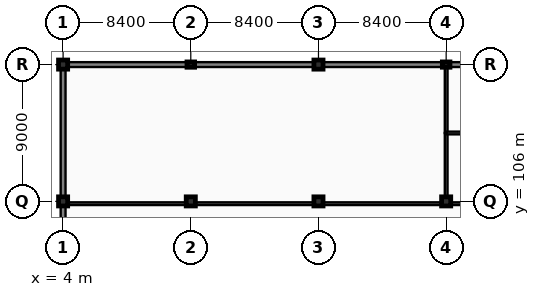
"""IFC4 building model, lengths in metres.
Left out: names, types, materials, properties, quantities, classifications, styles, units other than length and angle.
Written with IfcOpenShell. Run it as: python <this file> out.ifc"""

import sys

from ifc_helpers import new_model, si_unit, direction, frame, frame_2d, origin, origin_2d, place, context, subcontext, project, spatial, rectangle, extrude, element, fill, save


model = new_model("IFC4")
c1 = context("Model", 3, precision=1e-05, world=origin(), true_north=direction((0.0, 1.0)))
c2 = subcontext(c1, "Body", "Model", "MODEL_VIEW")
j1 = project(units=[si_unit("LENGTHUNIT", "METRE"), si_unit("PLANEANGLEUNIT", "RADIAN")], contexts=[c1])
p1 = place(None, origin())
s1 = spatial("IfcSite", under=j1, at=p1, CompositionType="ELEMENT")
p2 = place(p1, origin())
s2 = spatial("IfcBuilding", under=s1, at=p2, CompositionType="ELEMENT")
p3 = place(p2, origin())
s3 = spatial("IfcBuildingStorey", under=s2, at=p3, CompositionType="ELEMENT", Elevation=0.0)
for number, where, z_axis, x_axis in (
    (1, (4.0, 106.0, 0.0), (0.0, 0.0, 1.0), (1.0, 0.0, 0.0)),
    (2, (4.0, 115.0, 0.0), (0.0, 0.0, 1.0), (1.0, 0.0, 0.0)),
    (3, (12.4, 106.0, 0.0), (0.0, 0.0, 1.0), (1.0, 0.0, 0.0)),
):
    element("IfcColumn", number, at=place(p3, frame(where, z_axis=z_axis, x_axis=x_axis)), inside=s3, PredefinedType="COLUMN", context=c2, shape_type="SweptSolid", body=[
        extrude(rectangle(XDim=0.6, YDim=0.6, at=origin_2d()), origin(), (0.0, 0.0, 1.0), 5.4),
    ])
p4 = place(p3, frame((12.4, 115.0, 0.0), z_axis=(0.0, 0.0, 1.0), x_axis=(1.0, 0.0, 0.0)))
e4 = element("IfcColumn", 4, at=p4, inside=s3, PredefinedType="PILASTER", context=c2, shape_type="SweptSolid", body=[
    extrude(rectangle(XDim=0.5, YDim=0.35, at=origin_2d()), origin(), (0.0, 0.0, 1.0), 5.4),
])
for number, where, z_axis, x_axis in (
    (5, (20.8, 106.0, 0.0), (0.0, 0.0, 1.0), (1.0, 0.0, 0.0)),
    (6, (20.8, 115.0, 0.0), (0.0, 0.0, 1.0), (1.0, 0.0, 0.0)),
    (7, (29.2, 106.0, 0.0), (0.0, 0.0, 1.0), (1.0, 0.0, 0.0)),
):
    element("IfcColumn", number, at=place(p3, frame(where, z_axis=z_axis, x_axis=x_axis)), inside=s3, PredefinedType="COLUMN", context=c2, shape_type="SweptSolid", body=[
        extrude(rectangle(XDim=0.6, YDim=0.6, at=origin_2d()), origin(), (0.0, 0.0, 1.0), 5.4),
    ])
p5 = place(p3, frame((29.2, 115.0, 0.0), z_axis=(0.0, 0.0, 1.0), x_axis=(1.0, 0.0, 0.0)))
e8 = element("IfcColumn", 8, at=p5, inside=s3, PredefinedType="PILASTER", context=c2, shape_type="SweptSolid", body=[
    extrude(rectangle(XDim=0.5, YDim=0.35, at=origin_2d()), origin(), (0.0, 0.0, 1.0), 5.4),
])
p6 = place(p3, frame((4.15, 105.85, 0.0), z_axis=(0.0, 0.0, 1.0), x_axis=(1.0, 0.0, 0.0)))
e9 = element("IfcWall", 9, at=p6, inside=s3, PredefinedType="PARTITIONING", context=c2, shape_type="SweptSolid", body=[
    extrude(rectangle(XDim=25.05, YDim=0.18, at=frame_2d((12.525, 0.0))), origin(), (0.0, 0.0, 1.0), 4.54),
])
p7 = place(p6, frame((10.822, 0.0, -0.01)))
e10 = element("IfcOpeningElement", 10, at=p7, cuts=e9, PredefinedType="OPENING", context=c2, shape_type="SweptSolid", body=[
    extrude(rectangle(XDim=1.0, YDim=2.16, at=frame_2d((0.5, 1.08))), frame((0.0, 0.1, 0.0), z_axis=(0.0, -1.0, 0.0), x_axis=(1.0, 0.0, 0.0)), (0.0, 0.0, 1.0), 0.2),
])
p8 = place(p3, frame((29.2, 105.85, 0.0), z_axis=(0.0, 0.0, 1.0), x_axis=(1.0, 0.0, 0.0)))
e11 = element("IfcWall", 11, at=p8, inside=s3, PredefinedType="PARTITIONING", context=c2, shape_type="SweptSolid", body=[
    extrude(rectangle(XDim=4.65, YDim=0.18, at=frame_2d((2.325, 0.0))), origin(), (0.0, 0.0, 1.0), 4.54),
])
p9 = place(p8, frame((1.643, 0.0, -0.01)))
e12 = element("IfcOpeningElement", 12, at=p9, cuts=e11, PredefinedType="OPENING", context=c2, shape_type="SweptSolid", body=[
    extrude(rectangle(XDim=1.0, YDim=2.16, at=frame_2d((0.5, 1.08))), frame((0.0, 0.1, 0.0), z_axis=(0.0, -1.0, 0.0), x_axis=(1.0, 0.0, 0.0)), (0.0, 0.0, 1.0), 0.2),
])
p10 = place(p3, frame((29.2, 105.85, 0.0), z_axis=(0.0, 0.0, 1.0), x_axis=(0.0, 1.0, 0.0)))
e13 = element("IfcWall", 13, at=p10, inside=s3, PredefinedType="PARTITIONING", context=c2, shape_type="SweptSolid", body=[
    extrude(rectangle(XDim=4.65, YDim=0.18, at=frame_2d((2.325, 0.0))), origin(), (0.0, 0.0, 1.0), 4.54),
])
p11 = place(p3, frame((29.2, 110.5, 0.0), z_axis=(0.0, 0.0, 1.0), x_axis=(0.0, 1.0, 0.0)))
e14 = element("IfcWall", 14, at=p11, inside=s3, PredefinedType="PARTITIONING", context=c2, shape_type="SweptSolid", body=[
    extrude(rectangle(XDim=4.35, YDim=0.18, at=frame_2d((2.175, 0.0))), origin(), (0.0, 0.0, 1.0), 4.64),
])
p12 = place(p11, frame((1.675, 0.0, -0.01)))
e15 = element("IfcOpeningElement", 15, at=p12, cuts=e14, PredefinedType="OPENING", context=c2, shape_type="SweptSolid", body=[
    extrude(rectangle(XDim=1.0, YDim=2.16, at=frame_2d((0.5, 1.08))), frame((0.0, 0.1, 0.0), z_axis=(0.0, -1.0, 0.0), x_axis=(1.0, 0.0, 0.0)), (0.0, 0.0, 1.0), 0.2),
])
p13 = place(p3, frame((29.2, 110.5, 0.0), z_axis=(0.0, 0.0, 1.0), x_axis=(1.0, 0.0, 0.0)))
e16 = element("IfcWall", 16, at=p13, inside=s3, PredefinedType="PARTITIONING", context=c2, shape_type="SweptSolid", body=[
    extrude(rectangle(XDim=8.9, YDim=0.18, at=frame_2d((4.45, 0.0))), origin(), (0.0, 0.0, 1.0), 4.64),
])
p14 = place(p13, frame((1.975, 0.0, -0.01)))
e17 = element("IfcOpeningElement", 17, at=p14, cuts=e16, PredefinedType="OPENING", context=c2, shape_type="SweptSolid", body=[
    extrude(rectangle(XDim=1.0, YDim=2.16, at=frame_2d((0.5, 1.08))), frame((0.0, 0.1, 0.0), z_axis=(0.0, -1.0, 0.0), x_axis=(1.0, 0.0, 0.0)), (0.0, 0.0, 1.0), 0.2),
])
p15 = place(p3, frame((12.4, 115.0, 0.0), z_axis=(0.0, 0.0, 1.0), x_axis=(-1.0, 0.0, 0.0)))
e18 = element("IfcWall", 18, at=p15, inside=s3, PredefinedType="SOLIDWALL", context=c2, shape_type="SweptSolid", body=[
    extrude(rectangle(XDim=8.4, YDim=0.32, at=frame_2d((4.2, 0.0))), origin(), (0.0, 0.0, 1.0), 4.64),
])
p16 = place(p15, frame((0.46, 0.0, 0.9)))
e19 = element("IfcOpeningElement", 19, at=p16, cuts=e18, PredefinedType="OPENING", context=c2, shape_type="SweptSolid", body=[
    extrude(rectangle(XDim=2.4, YDim=2.35, at=frame_2d((1.2, 1.175))), frame((0.0, 0.17, 0.0), z_axis=(0.0, -1.0, 0.0), x_axis=(1.0, 0.0, 0.0)), (0.0, 0.0, 1.0), 0.34),
])
p17 = place(p15, frame((5.46, 0.0, 0.9)))
e20 = element("IfcOpeningElement", 20, at=p17, cuts=e18, PredefinedType="OPENING", context=c2, shape_type="SweptSolid", body=[
    extrude(rectangle(XDim=2.4, YDim=2.35, at=frame_2d((1.2, 1.175))), frame((0.0, 0.17, 0.0), z_axis=(0.0, -1.0, 0.0), x_axis=(1.0, 0.0, 0.0)), (0.0, 0.0, 1.0), 0.34),
])
p18 = place(p3, frame((20.8, 115.0, 0.0), z_axis=(0.0, 0.0, 1.0), x_axis=(-1.0, 0.0, 0.0)))
e21 = element("IfcWall", 21, at=p18, inside=s3, PredefinedType="SOLIDWALL", context=c2, shape_type="SweptSolid", body=[
    extrude(rectangle(XDim=8.4, YDim=0.32, at=frame_2d((4.2, 0.0))), origin(), (0.0, 0.0, 1.0), 4.64),
])
p19 = place(p18, frame((3.2, 0.0, -0.01)))
e22 = element("IfcOpeningElement", 22, at=p19, cuts=e21, PredefinedType="OPENING", context=c2, shape_type="SweptSolid", body=[
    extrude(rectangle(XDim=2.0, YDim=2.41, at=frame_2d((1.0, 1.205))), frame((0.0, 0.17, 0.0), z_axis=(0.0, -1.0, 0.0), x_axis=(1.0, 0.0, 0.0)), (0.0, 0.0, 1.0), 0.34),
])
p20 = place(p3, frame((29.2, 115.0, 0.0), z_axis=(0.0, 0.0, 1.0), x_axis=(-1.0, 0.0, 0.0)))
e23 = element("IfcWall", 23, at=p20, inside=s3, PredefinedType="SOLIDWALL", context=c2, shape_type="SweptSolid", body=[
    extrude(rectangle(XDim=8.4, YDim=0.32, at=frame_2d((4.2, 0.0))), origin(), (0.0, 0.0, 1.0), 4.64),
])
p21 = place(p20, frame((0.46, 0.0, 0.9)))
e24 = element("IfcOpeningElement", 24, at=p21, cuts=e23, PredefinedType="OPENING", context=c2, shape_type="SweptSolid", body=[
    extrude(rectangle(XDim=2.4, YDim=2.35, at=frame_2d((1.2, 1.175))), frame((0.0, 0.17, 0.0), z_axis=(0.0, -1.0, 0.0), x_axis=(1.0, 0.0, 0.0)), (0.0, 0.0, 1.0), 0.34),
])
p22 = place(p20, frame((5.46, 0.0, 0.9)))
e25 = element("IfcOpeningElement", 25, at=p22, cuts=e23, PredefinedType="OPENING", context=c2, shape_type="SweptSolid", body=[
    extrude(rectangle(XDim=2.4, YDim=2.35, at=frame_2d((1.2, 1.175))), frame((0.0, 0.17, 0.0), z_axis=(0.0, -1.0, 0.0), x_axis=(1.0, 0.0, 0.0)), (0.0, 0.0, 1.0), 0.34),
])
p23 = place(p3, frame((37.6, 115.0, 0.0), z_axis=(0.0, 0.0, 1.0), x_axis=(-1.0, 0.0, 0.0)))
e26 = element("IfcWall", 26, at=p23, inside=s3, PredefinedType="SOLIDWALL", context=c2, shape_type="SweptSolid", body=[
    extrude(rectangle(XDim=8.4, YDim=0.32, at=frame_2d((4.2, 0.0))), origin(), (0.0, 0.0, 1.0), 4.64),
])
p24 = place(p23, frame((0.46, 0.0, 0.9)))
e27 = element("IfcOpeningElement", 27, at=p24, cuts=e26, PredefinedType="OPENING", context=c2, shape_type="SweptSolid", body=[
    extrude(rectangle(XDim=2.4, YDim=2.35, at=frame_2d((1.2, 1.175))), frame((0.0, 0.17, 0.0), z_axis=(0.0, -1.0, 0.0), x_axis=(1.0, 0.0, 0.0)), (0.0, 0.0, 1.0), 0.34),
])
p25 = place(p23, frame((5.46, 0.0, 0.9)))
e28 = element("IfcOpeningElement", 28, at=p25, cuts=e26, PredefinedType="OPENING", context=c2, shape_type="SweptSolid", body=[
    extrude(rectangle(XDim=2.4, YDim=2.35, at=frame_2d((1.2, 1.175))), frame((0.0, 0.17, 0.0), z_axis=(0.0, -1.0, 0.0), x_axis=(1.0, 0.0, 0.0)), (0.0, 0.0, 1.0), 0.34),
])
p26 = place(p3, frame((4.0, 106.0, 0.0), z_axis=(0.0, 0.0, 1.0), x_axis=(0.0, -1.0, 0.0)))
e29 = element("IfcWall", 29, at=p26, inside=s3, PredefinedType="SOLIDWALL", context=c2, shape_type="SweptSolid", body=[
    extrude(rectangle(XDim=8.4, YDim=0.32, at=frame_2d((4.2, 0.0))), origin(), (0.0, 0.0, 1.0), 4.54),
])
p27 = place(p26, frame((4.26, 0.0, 0.9)))
e30 = element("IfcOpeningElement", 30, at=p27, cuts=e29, PredefinedType="OPENING", context=c2, shape_type="SweptSolid", body=[
    extrude(rectangle(XDim=2.4, YDim=2.35, at=frame_2d((1.2, 1.175))), frame((0.0, 0.17, 0.0), z_axis=(0.0, -1.0, 0.0), x_axis=(1.0, 0.0, 0.0)), (0.0, 0.0, 1.0), 0.34),
])
p28 = place(p3, frame((4.0, 115.0, 0.0), z_axis=(0.0, 0.0, 1.0), x_axis=(0.0, -1.0, 0.0)))
e31 = element("IfcWall", 31, at=p28, inside=s3, PredefinedType="SOLIDWALL", context=c2, shape_type="SweptSolid", body=[
    extrude(rectangle(XDim=9.0, YDim=0.32, at=frame_2d((4.5, 0.0))), origin(), (0.0, 0.0, 1.0), 4.54),
])
p29 = place(p28, frame((0.46, 0.0, 0.9)))
e32 = element("IfcOpeningElement", 32, at=p29, cuts=e31, PredefinedType="OPENING", context=c2, shape_type="SweptSolid", body=[
    extrude(rectangle(XDim=2.4, YDim=2.35, at=frame_2d((1.2, 1.175))), frame((0.0, 0.17, 0.0), z_axis=(0.0, -1.0, 0.0), x_axis=(1.0, 0.0, 0.0)), (0.0, 0.0, 1.0), 0.34),
])
p30 = place(p28, frame((6.06, 0.0, 0.9)))
e33 = element("IfcOpeningElement", 33, at=p30, cuts=e31, PredefinedType="OPENING", context=c2, shape_type="SweptSolid", body=[
    extrude(rectangle(XDim=2.4, YDim=2.35, at=frame_2d((1.2, 1.175))), frame((0.0, 0.17, 0.0), z_axis=(0.0, -1.0, 0.0), x_axis=(1.0, 0.0, 0.0)), (0.0, 0.0, 1.0), 0.34),
])
p31 = place(p7, frame((0.0, 0.0, 0.01)))
e34 = element("IfcDoor", 34, at=p31, inside=s3, OperationType="SINGLE_SWING_RIGHT", PredefinedType="DOOR", context=c2, shape_type="SweptSolid", body=[
    extrude(rectangle(XDim=1.0, YDim=2.15, at=frame_2d((0.5, 1.075))), frame((0.0, 0.025, 0.0), z_axis=(0.0, -1.0, 0.0), x_axis=(1.0, 0.0, 0.0)), (0.0, 0.0, 1.0), 0.05),
])
fill(e10, e34)
p32 = place(p12, frame((1.0, 0.0, 0.01), z_axis=(0.0, 0.0, 1.0), x_axis=(-1.0, 0.0, 0.0)))
e35 = element("IfcDoor", 35, at=p32, inside=s3, OperationType="SINGLE_SWING_RIGHT", PredefinedType="DOOR", context=c2, shape_type="SweptSolid", body=[
    extrude(rectangle(XDim=1.0, YDim=2.15, at=frame_2d((0.5, 1.075))), frame((0.0, 0.025, 0.0), z_axis=(0.0, -1.0, 0.0), x_axis=(1.0, 0.0, 0.0)), (0.0, 0.0, 1.0), 0.05),
])
fill(e15, e35)
p33 = place(p16, origin())
e36 = element("IfcWindow", 36, at=p33, inside=s3, PartitioningType="TRIPLE_PANEL_VERTICAL", PredefinedType="WINDOW", context=c2, shape_type="SweptSolid", body=[
    extrude(rectangle(XDim=2.4, YDim=2.35, at=frame_2d((1.2, 1.175))), frame((0.0, 0.03, 0.0), z_axis=(0.0, -1.0, 0.0), x_axis=(1.0, 0.0, 0.0)), (0.0, 0.0, 1.0), 0.06),
])
fill(e19, e36)
p34 = place(p17, origin())
e37 = element("IfcWindow", 37, at=p34, inside=s3, PartitioningType="TRIPLE_PANEL_VERTICAL", PredefinedType="WINDOW", context=c2, shape_type="SweptSolid", body=[
    extrude(rectangle(XDim=2.4, YDim=2.35, at=frame_2d((1.2, 1.175))), frame((0.0, 0.03, 0.0), z_axis=(0.0, -1.0, 0.0), x_axis=(1.0, 0.0, 0.0)), (0.0, 0.0, 1.0), 0.06),
])
fill(e20, e37)
p35 = place(p19, frame((0.0, 0.0, 0.01)))
e38 = element("IfcDoor", 38, at=p35, inside=s3, OperationType="DOUBLE_SWING_LEFT", PredefinedType="DOOR", context=c2, shape_type="SweptSolid", body=[
    extrude(rectangle(XDim=2.0, YDim=2.4, at=frame_2d((1.0, 1.2))), frame((0.0, 0.025, 0.0), z_axis=(0.0, -1.0, 0.0), x_axis=(1.0, 0.0, 0.0)), (0.0, 0.0, 1.0), 0.05),
])
fill(e22, e38)
p36 = place(p21, origin())
e39 = element("IfcWindow", 39, at=p36, inside=s3, PartitioningType="TRIPLE_PANEL_VERTICAL", PredefinedType="WINDOW", context=c2, shape_type="SweptSolid", body=[
    extrude(rectangle(XDim=2.4, YDim=2.35, at=frame_2d((1.2, 1.175))), frame((0.0, 0.03, 0.0), z_axis=(0.0, -1.0, 0.0), x_axis=(1.0, 0.0, 0.0)), (0.0, 0.0, 1.0), 0.06),
])
fill(e24, e39)
p37 = place(p22, origin())
e40 = element("IfcWindow", 40, at=p37, inside=s3, PartitioningType="TRIPLE_PANEL_VERTICAL", PredefinedType="WINDOW", context=c2, shape_type="SweptSolid", body=[
    extrude(rectangle(XDim=2.4, YDim=2.35, at=frame_2d((1.2, 1.175))), frame((0.0, 0.03, 0.0), z_axis=(0.0, -1.0, 0.0), x_axis=(1.0, 0.0, 0.0)), (0.0, 0.0, 1.0), 0.06),
])
fill(e25, e40)
p38 = place(p25, origin())
e41 = element("IfcWindow", 41, at=p38, inside=s3, PartitioningType="TRIPLE_PANEL_VERTICAL", PredefinedType="WINDOW", context=c2, shape_type="SweptSolid", body=[
    extrude(rectangle(XDim=2.4, YDim=2.35, at=frame_2d((1.2, 1.175))), frame((0.0, 0.03, 0.0), z_axis=(0.0, -1.0, 0.0), x_axis=(1.0, 0.0, 0.0)), (0.0, 0.0, 1.0), 0.06),
])
fill(e28, e41)
p39 = place(p29, origin())
e42 = element("IfcWindow", 42, at=p39, inside=s3, PartitioningType="TRIPLE_PANEL_VERTICAL", PredefinedType="WINDOW", context=c2, shape_type="SweptSolid", body=[
    extrude(rectangle(XDim=2.4, YDim=2.35, at=frame_2d((1.2, 1.175))), frame((0.0, 0.03, 0.0), z_axis=(0.0, -1.0, 0.0), x_axis=(1.0, 0.0, 0.0)), (0.0, 0.0, 1.0), 0.06),
])
fill(e32, e42)
p40 = place(p30, origin())
e43 = element("IfcWindow", 43, at=p40, inside=s3, PartitioningType="TRIPLE_PANEL_VERTICAL", PredefinedType="WINDOW", context=c2, shape_type="SweptSolid", body=[
    extrude(rectangle(XDim=2.4, YDim=2.35, at=frame_2d((1.2, 1.175))), frame((0.0, 0.03, 0.0), z_axis=(0.0, -1.0, 0.0), x_axis=(1.0, 0.0, 0.0)), (0.0, 0.0, 1.0), 0.06),
])
fill(e33, e43)
save(model, sys.argv[1])
